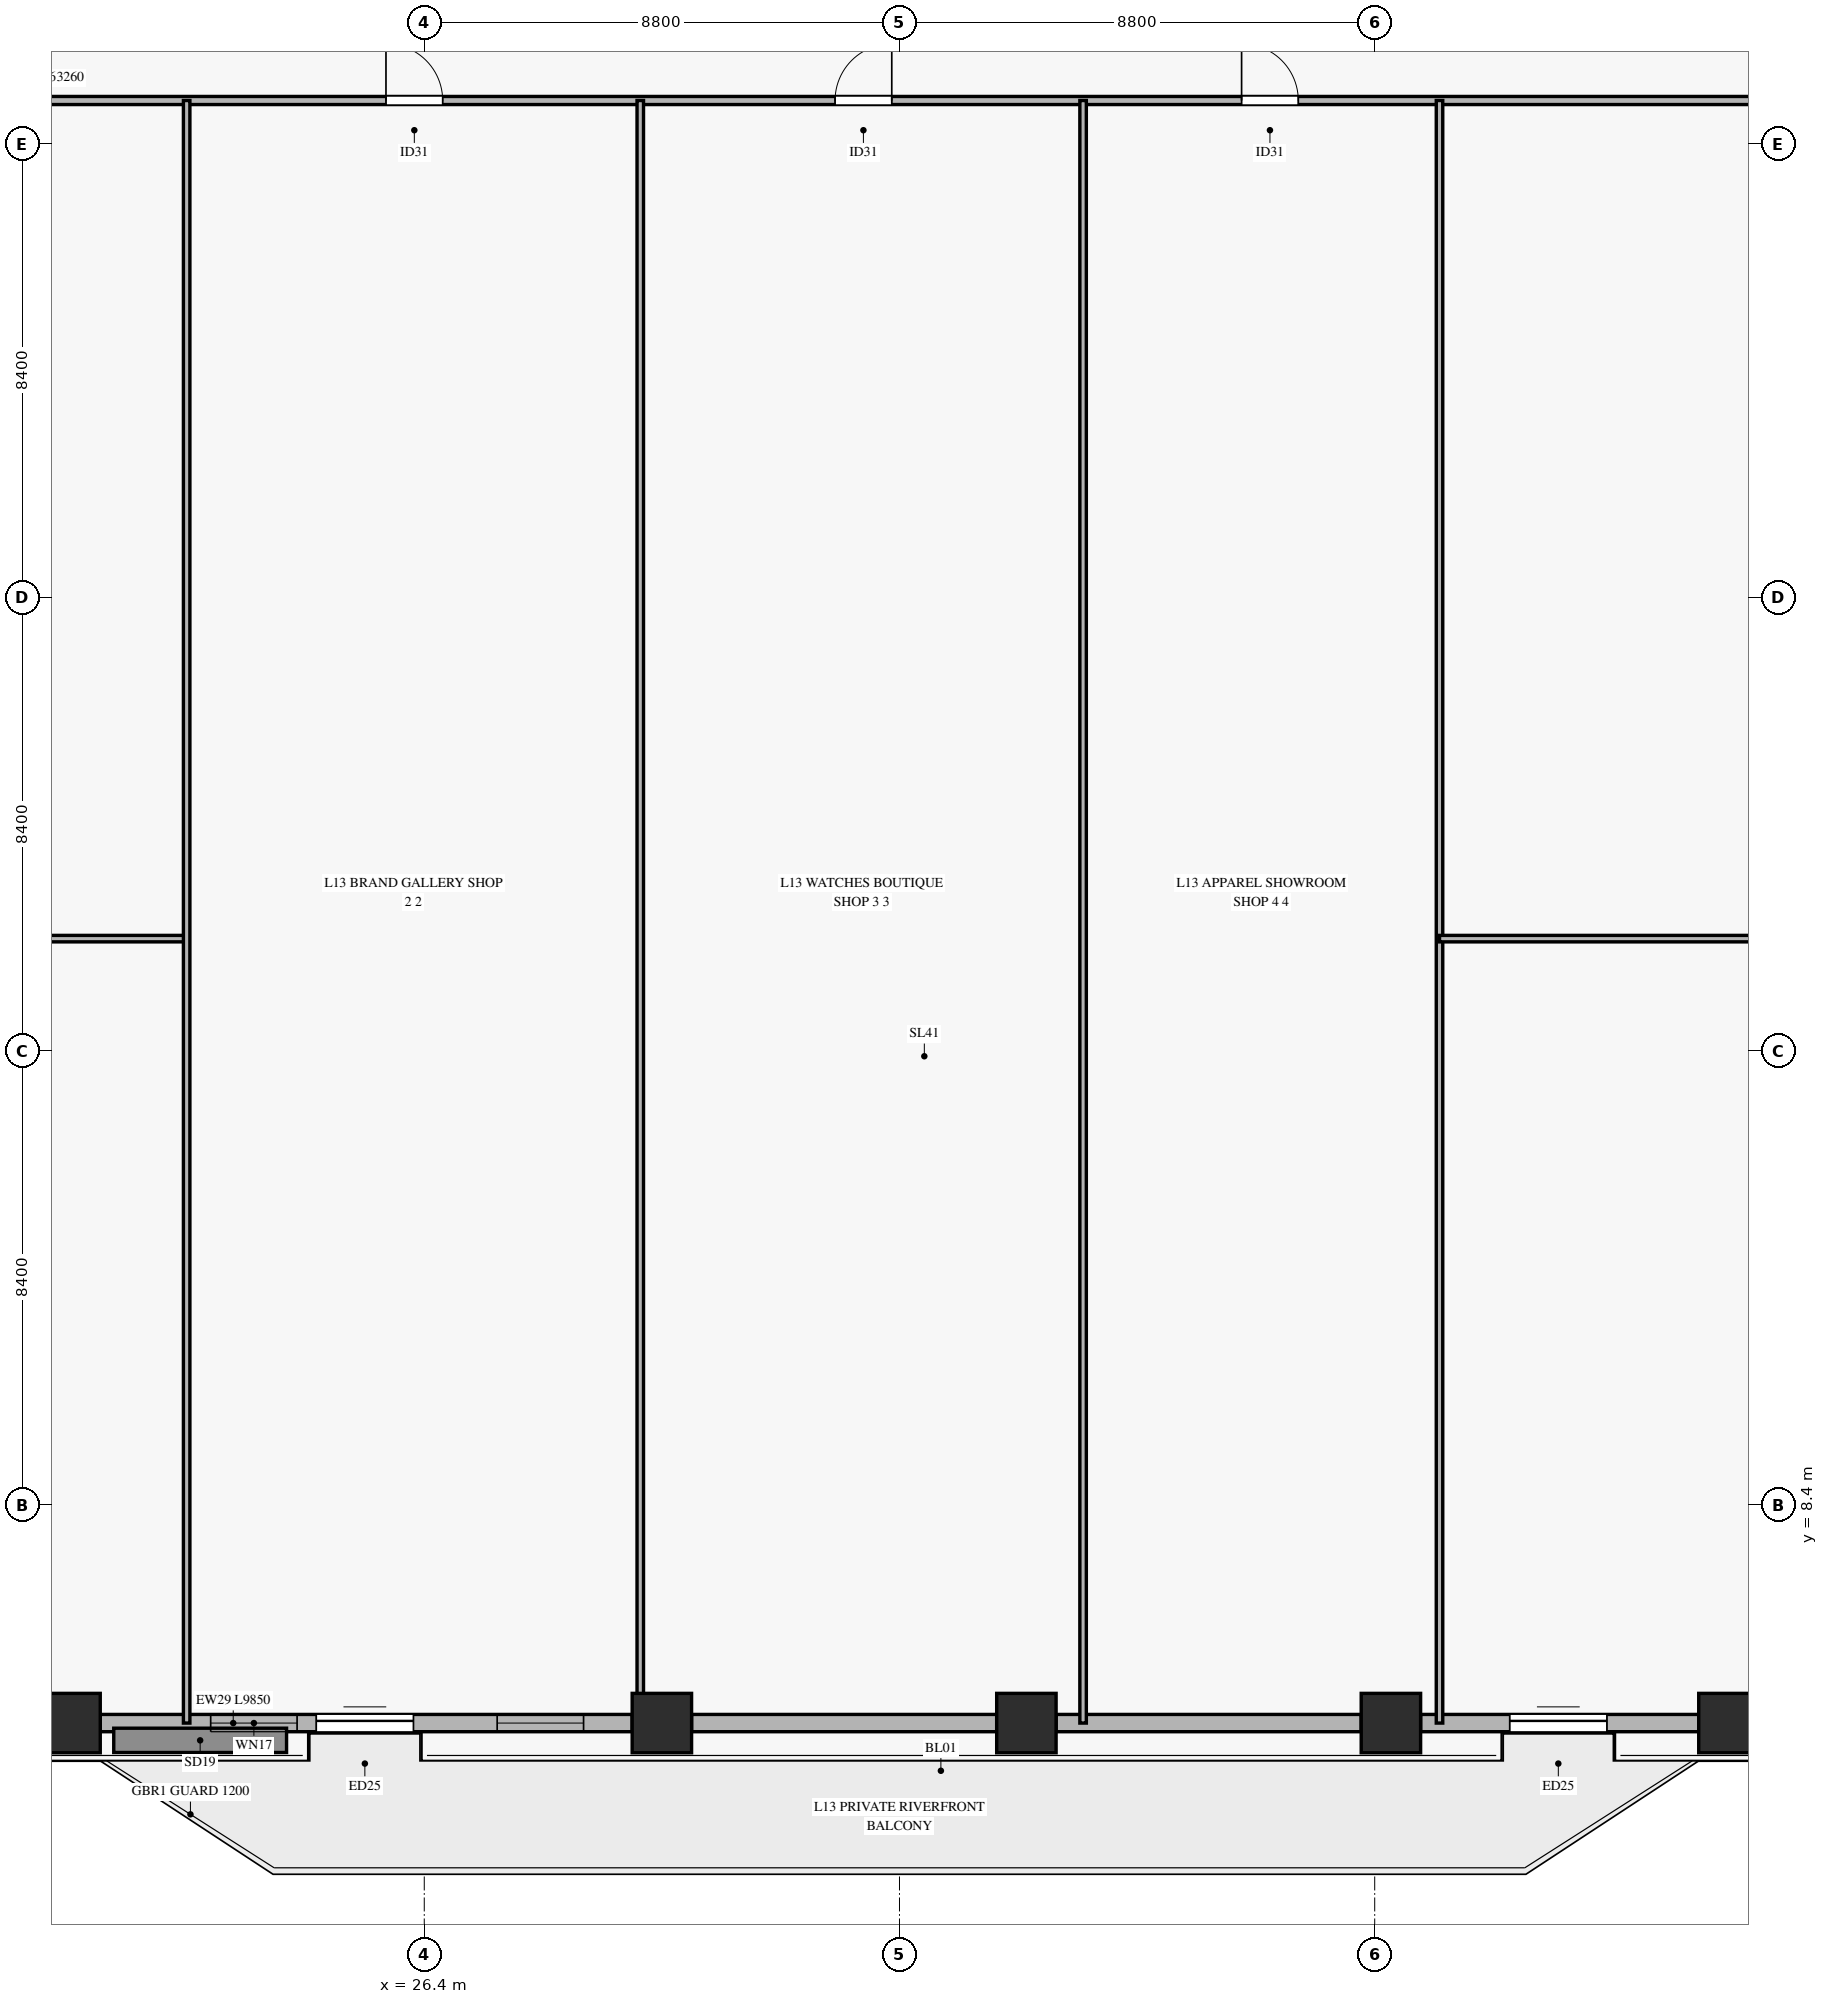
"""IFC4 building model, lengths in metres.
Left out: names, types, materials, properties, quantities, classifications, styles, units other than length and angle.
Written with IfcOpenShell. Run it as: python <this file> out.ifc"""

import sys

from ifc_helpers import new_model, si_unit, direction, frame, frame_2d, origin, origin_2d, place, context, subcontext, project, spatial, rectangle, hollow_rectangle, extrude, source, transform, mapped, element, fill, save


model = new_model("IFC4")
c1 = context("Model", 3, precision=1e-05, world=origin(), true_north=direction((0.0, 1.0)))
c2 = subcontext(c1, "Body", "Model", "MODEL_VIEW")
j1 = project(units=[si_unit("LENGTHUNIT", "METRE"), si_unit("PLANEANGLEUNIT", "RADIAN")], contexts=[c1])
p1 = place(None, origin())
s1 = spatial("IfcSite", under=j1, at=p1, CompositionType="ELEMENT")
p2 = place(p1, origin())
s2 = spatial("IfcBuilding", under=s1, at=p2, CompositionType="ELEMENT")
p3 = place(p2, frame((0.0, 0.0, 53.3)))
s3 = spatial("IfcBuildingStorey", under=s2, at=p3, CompositionType="ELEMENT", Elevation=53.3)
m1 = source(origin(), c2, "Body", "SweptSolid", [
    extrude(hollow_rectangle(XDim=1.1, YDim=1.1, WallThickness=0.05, at=origin_2d()), origin(), (0.0, 0.0, 1.0), 3.68),
])
for number, where, z_axis, x_axis in (
    (1, (19.85, 4.354, 0.0), (0.0, 0.0, 1.0), (1.0, 0.0, 0.0)),
    (2, (30.8, 4.354, 0.0), (0.0, 0.0, 1.0), (1.0, 0.0, 0.0)),
    (3, (37.55, 4.354, 0.0), (0.0, 0.0, 1.0), (1.0, 0.0, 0.0)),
    (4, (44.3, 4.354, 0.0), (0.0, 0.0, 1.0), (1.0, 0.0, 0.0)),
    (5, (50.55, 4.354, 0.0), (0.0, 0.0, 1.0), (1.0, 0.0, 0.0)),
):
    element("IfcColumn", number, at=place(p3, frame(where, z_axis=z_axis, x_axis=x_axis)), inside=s3, PredefinedType="COLUMN", context=c2, shape_type="MappedRepresentation", body=[
        mapped(m1, transform((0.0, 0.0, 0.0), x_axis=(1.0, 0.0, 0.0), y_axis=(0.0, 1.0, 0.0), z_axis=(0.0, 0.0, 1.0), scale=1.0)),
    ])
p4 = place(p3, frame((20.4, 4.354, 0.0), z_axis=(0.0, 0.0, 1.0), x_axis=(1.0, 0.0, 0.0)))
e6 = element("IfcWall", 6, at=p4, inside=s3, PredefinedType="SOLIDWALL", context=c2, shape_type="SweptSolid", body=[
    extrude(rectangle(XDim=9.85, YDim=0.32, at=frame_2d((4.925, 0.0))), origin(), (0.0, 0.0, 1.0), 3.16),
])
p5 = place(p4, frame((4.0, 0.0, 0.0)))
e7 = element("IfcOpeningElement", 7, at=p5, cuts=e6, PredefinedType="OPENING", context=c2, shape_type="SweptSolid", body=[
    extrude(rectangle(XDim=1.8, YDim=2.25, at=frame_2d((0.9, 1.125))), frame((0.0, 0.17, 0.0), z_axis=(0.0, -1.0, 0.0), x_axis=(1.0, 0.0, 0.0)), (0.0, 0.0, 1.0), 0.34),
])
p6 = place(p4, frame((2.045, 0.0, 0.45)))
e8 = element("IfcOpeningElement", 8, at=p6, cuts=e6, PredefinedType="OPENING", context=c2, shape_type="SweptSolid", body=[
    extrude(rectangle(XDim=1.6, YDim=2.0, at=frame_2d((0.8, 1.0))), frame((0.0, 0.17, 0.0), z_axis=(0.0, -1.0, 0.0), x_axis=(1.0, 0.0, 0.0)), (0.0, 0.0, 1.0), 0.34),
])
p7 = place(p4, frame((7.35, 0.0, 0.45)))
e9 = element("IfcOpeningElement", 9, at=p7, cuts=e6, PredefinedType="OPENING", context=c2, shape_type="SweptSolid", body=[
    extrude(rectangle(XDim=1.6, YDim=2.0, at=frame_2d((0.8, 1.0))), frame((0.0, 0.17, 0.0), z_axis=(0.0, -1.0, 0.0), x_axis=(1.0, 0.0, 0.0)), (0.0, 0.0, 1.0), 0.34),
])
for number, where, z_axis, x_axis in (
    (10, (31.35, 4.354, 0.0), (0.0, 0.0, 1.0), (1.0, 0.0, 0.0)),
    (11, (38.1, 4.354, 0.0), (0.0, 0.0, 1.0), (1.0, 0.0, 0.0)),
):
    element("IfcWall", number, at=place(p3, frame(where, z_axis=z_axis, x_axis=x_axis)), inside=s3, PredefinedType="SOLIDWALL", context=c2, shape_type="SweptSolid", body=[
        extrude(rectangle(XDim=5.65, YDim=0.32, at=frame_2d((2.825, 0.0))), origin(), (0.0, 0.0, 1.0), 3.16),
    ])
p8 = place(p3, frame((44.85, 4.354, 0.0), z_axis=(0.0, 0.0, 1.0), x_axis=(1.0, 0.0, 0.0)))
e12 = element("IfcWall", 12, at=p8, inside=s3, PredefinedType="SOLIDWALL", context=c2, shape_type="SweptSolid", body=[
    extrude(rectangle(XDim=5.15, YDim=0.32, at=frame_2d((2.575, 0.0))), origin(), (0.0, 0.0, 1.0), 3.16),
])
p9 = place(p8, frame((1.65, 0.0, 0.0)))
e13 = element("IfcOpeningElement", 13, at=p9, cuts=e12, PredefinedType="OPENING", context=c2, shape_type="SweptSolid", body=[
    extrude(rectangle(XDim=1.8, YDim=2.25, at=frame_2d((0.9, 1.125))), frame((0.0, 0.17, 0.0), z_axis=(0.0, -1.0, 0.0), x_axis=(1.0, 0.0, 0.0)), (0.0, 0.0, 1.0), 0.34),
])
p10 = place(p3, frame((3.57, 34.4, 0.0), z_axis=(0.0, 0.0, 1.0), x_axis=(1.0, 0.0, 0.0)))
e14 = element("IfcWall", 14, at=p10, inside=s3, PredefinedType="PARTITIONING", context=c2, shape_type="SweptSolid", body=[
    extrude(rectangle(XDim=63.26, YDim=0.15, at=frame_2d((31.63, 0.0))), origin(), (0.0, 0.0, 1.0), 2.765),
])
p11 = place(p10, frame((7.658, 0.0, 0.0)))
e15 = element("IfcOpeningElement", 15, at=p11, cuts=e14, PredefinedType="OPENING", context=c2, shape_type="SweptSolid", body=[
    extrude(rectangle(XDim=1.05, YDim=2.15, at=frame_2d((0.525, 1.075))), frame((0.0, 0.085, 0.0), z_axis=(0.0, -1.0, 0.0), x_axis=(1.0, 0.0, 0.0)), (0.0, 0.0, 1.0), 0.17),
])
p12 = place(p10, frame((22.121, 0.0, 0.0)))
e16 = element("IfcOpeningElement", 16, at=p12, cuts=e14, PredefinedType="OPENING", context=c2, shape_type="SweptSolid", body=[
    extrude(rectangle(XDim=1.05, YDim=2.15, at=frame_2d((0.525, 1.075))), frame((0.0, 0.085, 0.0), z_axis=(0.0, -1.0, 0.0), x_axis=(1.0, 0.0, 0.0)), (0.0, 0.0, 1.0), 0.17),
])
p13 = place(p10, frame((30.437, 0.0, 0.0)))
e17 = element("IfcOpeningElement", 17, at=p13, cuts=e14, PredefinedType="OPENING", context=c2, shape_type="SweptSolid", body=[
    extrude(rectangle(XDim=1.05, YDim=2.15, at=frame_2d((0.525, 1.075))), frame((0.0, 0.085, 0.0), z_axis=(0.0, -1.0, 0.0), x_axis=(1.0, 0.0, 0.0)), (0.0, 0.0, 1.0), 0.17),
])
p14 = place(p10, frame((37.965, 0.0, 0.0)))
e18 = element("IfcOpeningElement", 18, at=p14, cuts=e14, PredefinedType="OPENING", context=c2, shape_type="SweptSolid", body=[
    extrude(rectangle(XDim=1.05, YDim=2.15, at=frame_2d((0.525, 1.075))), frame((0.0, 0.085, 0.0), z_axis=(0.0, -1.0, 0.0), x_axis=(1.0, 0.0, 0.0)), (0.0, 0.0, 1.0), 0.17),
])
p15 = place(p10, frame((50.368, 0.0, 0.0)))
e19 = element("IfcOpeningElement", 19, at=p15, cuts=e14, PredefinedType="OPENING", context=c2, shape_type="SweptSolid", body=[
    extrude(rectangle(XDim=1.05, YDim=2.15, at=frame_2d((0.525, 1.075))), frame((0.0, 0.085, 0.0), z_axis=(0.0, -1.0, 0.0), x_axis=(1.0, 0.0, 0.0)), (0.0, 0.0, 1.0), 0.17),
])
p16 = place(p3, frame((3.57, 18.88, 0.0), z_axis=(0.0, 0.0, 1.0), x_axis=(1.0, 0.0, 0.0)))
e20 = element("IfcWall", 20, at=p16, inside=s3, PredefinedType="PARTITIONING", context=c2, shape_type="SweptSolid", body=[
    extrude(rectangle(XDim=18.43, YDim=0.12, at=frame_2d((9.215, 0.0))), origin(), (0.0, 0.0, 1.0), 2.765),
])
p17 = place(p16, frame((8.019, 0.0, 0.0)))
e21 = element("IfcOpeningElement", 21, at=p17, cuts=e20, PredefinedType="OPENING", context=c2, shape_type="SweptSolid", body=[
    extrude(rectangle(XDim=0.95, YDim=2.1, at=frame_2d((0.475, 1.05))), frame((0.0, 0.07, 0.0), z_axis=(0.0, -1.0, 0.0), x_axis=(1.0, 0.0, 0.0)), (0.0, 0.0, 1.0), 0.14),
])
p18 = place(p3, frame((22.0, 4.354, 0.0), z_axis=(0.0, 0.0, 1.0), x_axis=(0.0, 1.0, 0.0)))
e22 = element("IfcWall", 22, at=p18, inside=s3, PredefinedType="PARTITIONING", context=c2, shape_type="SweptSolid", body=[
    extrude(rectangle(XDim=30.046, YDim=0.12, at=frame_2d((15.023, 0.0))), origin(), (0.0, 0.0, 1.0), 3.165),
])
p19 = place(p3, frame((30.4, 4.354, 0.0), z_axis=(0.0, 0.0, 1.0), x_axis=(0.0, 1.0, 0.0)))
e23 = element("IfcWall", 23, at=p19, inside=s3, PredefinedType="PARTITIONING", context=c2, shape_type="SweptSolid", body=[
    extrude(rectangle(XDim=30.046, YDim=0.12, at=frame_2d((15.023, 0.0))), origin(), (0.0, 0.0, 1.0), 3.215),
])
for number, where, z_axis, x_axis in (
    (24, (38.6, 4.354, 0.0), (0.0, 0.0, 1.0), (0.0, 1.0, 0.0)),
    (25, (45.2, 4.354, 0.0), (0.0, 0.0, 1.0), (0.0, 1.0, 0.0)),
):
    element("IfcWall", number, at=place(p3, frame(where, z_axis=z_axis, x_axis=x_axis)), inside=s3, PredefinedType="PARTITIONING", context=c2, shape_type="SweptSolid", body=[
        extrude(rectangle(XDim=30.046, YDim=0.12, at=frame_2d((15.023, 0.0))), origin(), (0.0, 0.0, 1.0), 3.165),
    ])
p20 = place(p3, frame((45.2, 18.88, 0.0), z_axis=(0.0, 0.0, 1.0), x_axis=(1.0, 0.0, 0.0)))
e26 = element("IfcWall", 26, at=p20, inside=s3, PredefinedType="PARTITIONING", context=c2, shape_type="SweptSolid", body=[
    extrude(rectangle(XDim=21.63, YDim=0.12, at=frame_2d((10.815, 0.0))), origin(), (0.0, 0.0, 1.0), 2.765),
])
p21 = place(p20, frame((9.163, 0.0, 0.0)))
e27 = element("IfcOpeningElement", 27, at=p21, cuts=e26, PredefinedType="OPENING", context=c2, shape_type="SweptSolid", body=[
    extrude(rectangle(XDim=0.95, YDim=2.1, at=frame_2d((0.475, 1.05))), frame((0.0, 0.07, 0.0), z_axis=(0.0, -1.0, 0.0), x_axis=(1.0, 0.0, 0.0)), (0.0, 0.0, 1.0), 0.14),
])
m2 = source(origin(), c2, "Body", "SweptSolid", [
    extrude(rectangle(XDim=1.8, YDim=2.25, at=frame_2d((0.9, 1.125))), frame((0.0, 0.025, 0.0), z_axis=(0.0, -1.0, 0.0), x_axis=(1.0, 0.0, 0.0)), (0.0, 0.0, 1.0), 0.05),
])
p22 = place(p5, origin())
e28 = element("IfcDoor", 28, at=p22, inside=s3, OperationType="SLIDING_TO_LEFT", PredefinedType="DOOR", context=c2, shape_type="MappedRepresentation", body=[
    mapped(m2, transform((0.0, 0.0, 0.0), x_axis=(1.0, 0.0, 0.0), y_axis=(0.0, 1.0, 0.0), z_axis=(0.0, 0.0, 1.0), scale=1.0)),
])
fill(e7, e28)
m3 = source(origin(), c2, "Body", "SweptSolid", [
    extrude(rectangle(XDim=1.6, YDim=2.0, at=frame_2d((0.8, 1.0))), frame((0.0, 0.03, 0.0), z_axis=(0.0, -1.0, 0.0), x_axis=(1.0, 0.0, 0.0)), (0.0, 0.0, 1.0), 0.06),
])
p23 = place(p6, origin())
e29 = element("IfcWindow", 29, at=p23, inside=s3, PartitioningType="SINGLE_PANEL", PredefinedType="WINDOW", context=c2, shape_type="MappedRepresentation", body=[
    mapped(m3, transform((0.0, 0.0, 0.0), x_axis=(1.0, 0.0, 0.0), y_axis=(0.0, 1.0, 0.0), z_axis=(0.0, 0.0, 1.0), scale=1.0)),
])
fill(e8, e29)
p24 = place(p7, origin())
e30 = element("IfcWindow", 30, at=p24, inside=s3, PartitioningType="SINGLE_PANEL", PredefinedType="WINDOW", context=c2, shape_type="MappedRepresentation", body=[
    mapped(m3, transform((0.0, 0.0, 0.0), x_axis=(1.0, 0.0, 0.0), y_axis=(0.0, 1.0, 0.0), z_axis=(0.0, 0.0, 1.0), scale=1.0)),
])
fill(e9, e30)
p25 = place(p9, origin())
e31 = element("IfcDoor", 31, at=p25, inside=s3, OperationType="SLIDING_TO_LEFT", PredefinedType="DOOR", context=c2, shape_type="MappedRepresentation", body=[
    mapped(m2, transform((0.0, 0.0, 0.0), x_axis=(1.0, 0.0, 0.0), y_axis=(0.0, 1.0, 0.0), z_axis=(0.0, 0.0, 1.0), scale=1.0)),
])
fill(e13, e31)
m4 = source(origin(), c2, "Body", "SweptSolid", [
    extrude(rectangle(XDim=1.05, YDim=2.15, at=frame_2d((0.525, 1.075))), frame((0.0, 0.025, 0.0), z_axis=(0.0, -1.0, 0.0), x_axis=(1.0, 0.0, 0.0)), (0.0, 0.0, 1.0), 0.05),
])
p26 = place(p12, origin())
e32 = element("IfcDoor", 32, at=p26, inside=s3, OperationType="SINGLE_SWING_LEFT", PredefinedType="DOOR", context=c2, shape_type="MappedRepresentation", body=[
    mapped(m4, transform((0.0, 0.0, 0.0), x_axis=(1.0, 0.0, 0.0), y_axis=(0.0, 1.0, 0.0), z_axis=(0.0, 0.0, 1.0), scale=1.0)),
])
fill(e16, e32)
p27 = place(p13, origin())
e33 = element("IfcDoor", 33, at=p27, inside=s3, OperationType="SINGLE_SWING_RIGHT", PredefinedType="DOOR", context=c2, shape_type="MappedRepresentation", body=[
    mapped(m4, transform((0.0, 0.0, 0.0), x_axis=(1.0, 0.0, 0.0), y_axis=(0.0, 1.0, 0.0), z_axis=(0.0, 0.0, 1.0), scale=1.0)),
])
fill(e17, e33)
p28 = place(p14, origin())
e34 = element("IfcDoor", 34, at=p28, inside=s3, OperationType="SINGLE_SWING_LEFT", PredefinedType="DOOR", context=c2, shape_type="MappedRepresentation", body=[
    mapped(m4, transform((0.0, 0.0, 0.0), x_axis=(1.0, 0.0, 0.0), y_axis=(0.0, 1.0, 0.0), z_axis=(0.0, 0.0, 1.0), scale=1.0)),
])
fill(e18, e34)
save(model, sys.argv[1])
